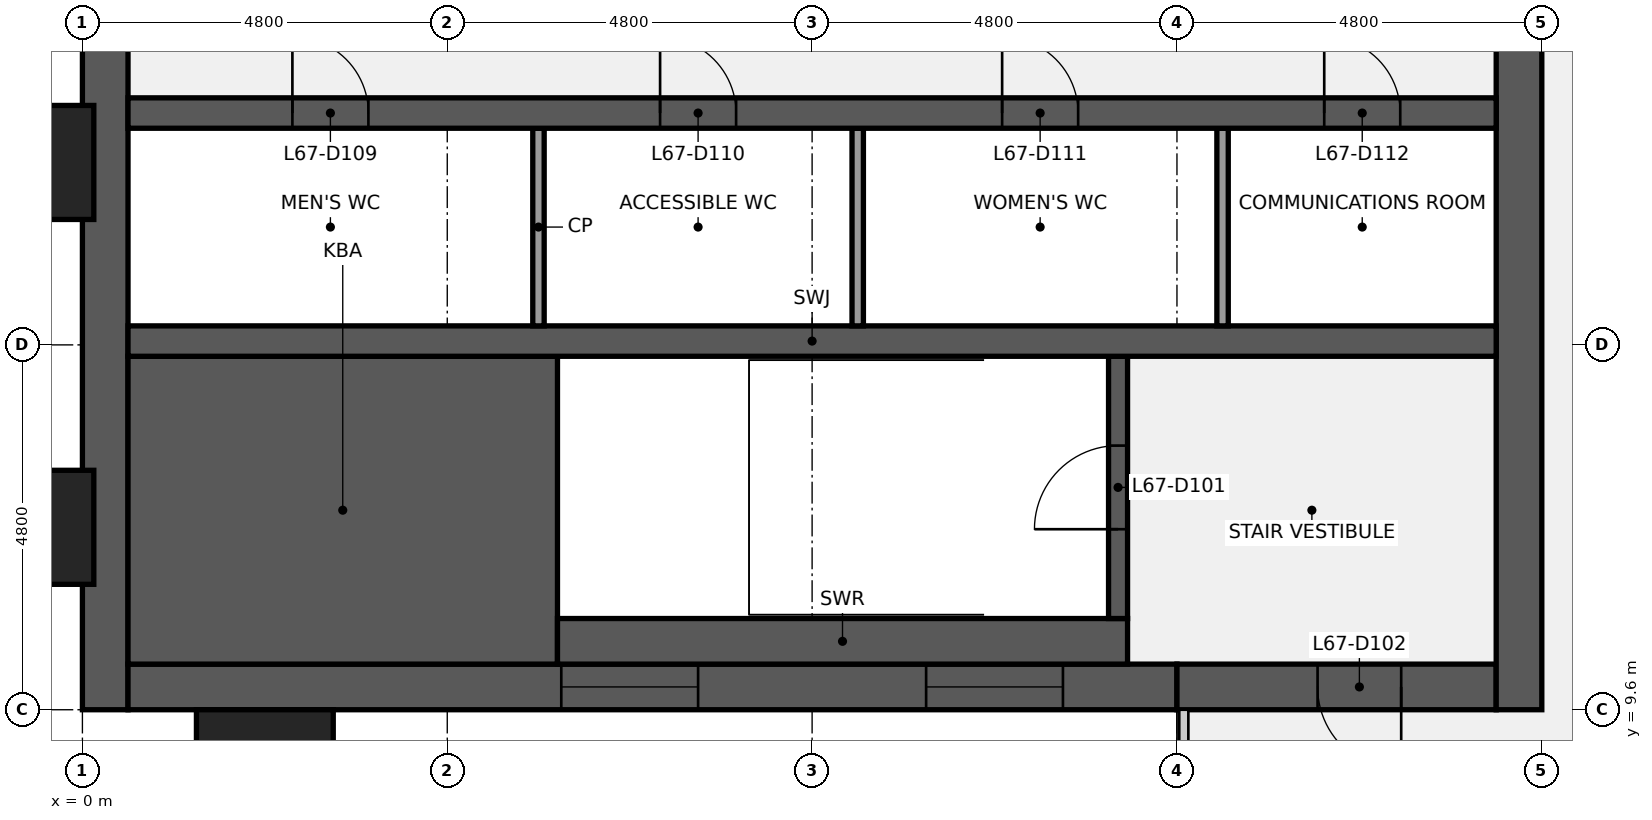
"""IFC4 building model, lengths in metres.
Left out: names, types, materials, properties, quantities, classifications, styles, units other than length and angle.
Written with IfcOpenShell. Run it as: python <this file> out.ifc"""

import sys

from ifc_helpers import new_model, si_unit, direction, frame, frame_2d, origin, origin_2d, place, context, subcontext, project, spatial, rectangle, extrude, element, fill, save


model = new_model("IFC4")
c1 = context("Model", 3, precision=1e-05, world=origin(), true_north=direction((0.0, 1.0)))
c2 = subcontext(c1, "Body", "Model", "MODEL_VIEW")
j1 = project(units=[si_unit("LENGTHUNIT", "METRE"), si_unit("PLANEANGLEUNIT", "RADIAN")], contexts=[c1])
p1 = place(None, origin())
s1 = spatial("IfcSite", under=j1, at=p1, CompositionType="ELEMENT")
p2 = place(p1, origin())
s2 = spatial("IfcBuilding", under=s1, at=p2, CompositionType="ELEMENT")
p3 = place(p2, frame((0.0, 0.0, 306.3)))
s3 = spatial("IfcBuildingStorey", under=s2, at=p3, CompositionType="ELEMENT", Elevation=306.3)
p4 = place(p3, frame((0.3, 9.6, 0.0), z_axis=(0.0, 0.0, 1.0), x_axis=(0.0, 1.0, 0.0)))
e1 = element("IfcWall", 1, at=p4, inside=s3, PredefinedType="SHEAR", context=c2, shape_type="SweptSolid", body=[
    extrude(rectangle(XDim=28.8, YDim=0.6, at=frame_2d((14.4, 0.0))), origin(), (0.0, 0.0, 1.0), 3.84),
])
p5 = place(p4, frame((8.85, 0.0, 0.9)))
e2 = element("IfcOpeningElement", 2, at=p5, cuts=e1, PredefinedType="OPENING", context=c2, shape_type="SweptSolid", body=[
    extrude(rectangle(XDim=1.5, YDim=1.5, at=frame_2d((0.75, 0.75))), frame((0.0, 0.31, 0.0), z_axis=(0.0, -1.0, 0.0), x_axis=(1.0, 0.0, 0.0)), (0.0, 0.0, 1.0), 0.62),
])
p6 = place(p4, frame((18.45, 0.0, 0.9)))
e3 = element("IfcOpeningElement", 3, at=p6, cuts=e1, PredefinedType="OPENING", context=c2, shape_type="SweptSolid", body=[
    extrude(rectangle(XDim=1.5, YDim=1.5, at=frame_2d((0.75, 0.75))), frame((0.0, 0.31, 0.0), z_axis=(0.0, -1.0, 0.0), x_axis=(1.0, 0.0, 0.0)), (0.0, 0.0, 1.0), 0.62),
])
p7 = place(p3, frame((14.4, 9.9, 0.0), z_axis=(0.0, 0.0, 1.0), x_axis=(-1.0, 0.0, 0.0)))
e4 = element("IfcWall", 4, at=p7, inside=s3, PredefinedType="SHEAR", context=c2, shape_type="SweptSolid", body=[
    extrude(rectangle(XDim=13.8, YDim=0.6, at=frame_2d((6.9, 0.0))), origin(), (0.0, 0.0, 1.0), 3.84),
])
p8 = place(p7, frame((6.3, 0.0, 0.9)))
e5 = element("IfcOpeningElement", 5, at=p8, cuts=e4, PredefinedType="OPENING", context=c2, shape_type="SweptSolid", body=[
    extrude(rectangle(XDim=1.8, YDim=1.5, at=frame_2d((0.9, 0.75))), frame((0.0, 0.31, 0.0), z_axis=(0.0, -1.0, 0.0), x_axis=(1.0, 0.0, 0.0)), (0.0, 0.0, 1.0), 0.62),
])
p9 = place(p7, frame((1.5, 0.0, 0.9)))
e6 = element("IfcOpeningElement", 6, at=p9, cuts=e4, PredefinedType="OPENING", context=c2, shape_type="SweptSolid", body=[
    extrude(rectangle(XDim=1.8, YDim=1.5, at=frame_2d((0.9, 0.75))), frame((0.0, 0.31, 0.0), z_axis=(0.0, -1.0, 0.0), x_axis=(1.0, 0.0, 0.0)), (0.0, 0.0, 1.0), 0.62),
])
p10 = place(p3, frame((18.6, 9.9, 0.0), z_axis=(0.0, 0.0, 1.0), x_axis=(-1.0, 0.0, 0.0)))
e7 = element("IfcWall", 7, at=p10, inside=s3, PredefinedType="SHEAR", context=c2, shape_type="SweptSolid", body=[
    extrude(rectangle(XDim=4.2, YDim=0.6, at=frame_2d((2.1, 0.0))), origin(), (0.0, 0.0, 1.0), 3.84),
])
p11 = place(p10, frame((1.25, 0.0, 0.0)))
e8 = element("IfcOpeningElement", 8, at=p11, cuts=e7, PredefinedType="OPENING", context=c2, shape_type="SweptSolid", body=[
    extrude(rectangle(XDim=1.1, YDim=2.1, at=frame_2d((0.55, 1.05))), frame((0.0, 0.31, 0.0), z_axis=(0.0, -1.0, 0.0), x_axis=(1.0, 0.0, 0.0)), (0.0, 0.0, 1.0), 0.62),
])
p12 = place(p3, frame((18.9, 38.4, 0.0), z_axis=(0.0, 0.0, 1.0), x_axis=(0.0, -1.0, 0.0)))
e9 = element("IfcWall", 9, at=p12, inside=s3, PredefinedType="SHEAR", context=c2, shape_type="SweptSolid", body=[
    extrude(rectangle(XDim=28.8, YDim=0.6, at=frame_2d((14.4, 0.0))), origin(), (0.0, 0.0, 1.0), 3.84),
])
p13 = place(p12, frame((18.3, 0.0, 0.0)))
e10 = element("IfcOpeningElement", 10, at=p13, cuts=e9, PredefinedType="OPENING", context=c2, shape_type="SweptSolid", body=[
    extrude(rectangle(XDim=1.8, YDim=2.1, at=frame_2d((0.9, 1.05))), frame((0.0, 0.31, 0.0), z_axis=(0.0, -1.0, 0.0), x_axis=(1.0, 0.0, 0.0)), (0.0, 0.0, 1.0), 0.62),
])
p14 = place(p12, frame((8.7, 0.0, 0.0)))
e11 = element("IfcOpeningElement", 11, at=p14, cuts=e9, PredefinedType="OPENING", context=c2, shape_type="SweptSolid", body=[
    extrude(rectangle(XDim=1.8, YDim=2.1, at=frame_2d((0.9, 1.05))), frame((0.0, 0.31, 0.0), z_axis=(0.0, -1.0, 0.0), x_axis=(1.0, 0.0, 0.0)), (0.0, 0.0, 1.0), 0.62),
])
p15 = place(p3, frame((0.6, 12.225, 0.0), z_axis=(0.0, 0.0, 1.0), x_axis=(1.0, 0.0, 0.0)))
e12 = element("IfcWall", 12, at=p15, inside=s3, PredefinedType="SHEAR", context=c2, shape_type="SweptSolid", body=[
    extrude(rectangle(XDim=5.65, YDim=4.05, at=frame_2d((2.825, 0.0))), origin(), (0.0, 0.0, 1.0), 3.84),
])
p16 = place(p3, frame((6.25, 10.5, 0.0), z_axis=(0.0, 0.0, 1.0), x_axis=(1.0, 0.0, 0.0)))
e13 = element("IfcWall", 13, at=p16, inside=s3, PredefinedType="SHEAR", context=c2, shape_type="SweptSolid", body=[
    extrude(rectangle(XDim=7.5, YDim=0.6, at=frame_2d((3.75, 0.0))), origin(), (0.0, 0.0, 1.0), 3.84),
])
p17 = place(p3, frame((13.625, 10.8, 0.0), z_axis=(0.0, 0.0, 1.0), x_axis=(0.0, 1.0, 0.0)))
e14 = element("IfcWall", 14, at=p17, inside=s3, PredefinedType="SHEAR", context=c2, shape_type="SweptSolid", body=[
    extrude(rectangle(XDim=3.45, YDim=0.25, at=frame_2d((1.725, 0.0))), origin(), (0.0, 0.0, 1.0), 3.84),
])
p18 = place(p17, frame((1.175, 0.0, 0.0)))
e15 = element("IfcOpeningElement", 15, at=p18, cuts=e14, PredefinedType="OPENING", context=c2, shape_type="SweptSolid", body=[
    extrude(rectangle(XDim=1.1, YDim=2.1, at=frame_2d((0.55, 1.05))), frame((0.0, 0.135, 0.0), z_axis=(0.0, -1.0, 0.0), x_axis=(1.0, 0.0, 0.0)), (0.0, 0.0, 1.0), 0.27),
])
p19 = place(p3, frame((0.6, 14.45, 0.0), z_axis=(0.0, 0.0, 1.0), x_axis=(1.0, 0.0, 0.0)))
e16 = element("IfcWall", 16, at=p19, inside=s3, PredefinedType="SHEAR", context=c2, shape_type="SweptSolid", body=[
    extrude(rectangle(XDim=18.0, YDim=0.4, at=frame_2d((9.0, 0.0))), origin(), (0.0, 0.0, 1.0), 3.84),
])
for number, where, z_axis, x_axis in (
    (17, (6.0, 14.65, 0.0), (0.0, 0.0, 1.0), (0.0, 1.0, 0.0)),
    (18, (10.2, 14.65, 0.0), (0.0, 0.0, 1.0), (0.0, 1.0, 0.0)),
    (19, (15.0, 14.65, 0.0), (0.0, 0.0, 1.0), (0.0, 1.0, 0.0)),
):
    element("IfcWall", number, at=place(p3, frame(where, z_axis=z_axis, x_axis=x_axis)), inside=s3, PredefinedType="PARTITIONING", context=c2, shape_type="SweptSolid", body=[
        extrude(rectangle(XDim=2.6, YDim=0.15, at=frame_2d((1.3, 0.0))), origin(), (0.0, 0.0, 1.0), 3.84),
    ])
p20 = place(p3, frame((0.6, 17.45, 0.0), z_axis=(0.0, 0.0, 1.0), x_axis=(1.0, 0.0, 0.0)))
e20 = element("IfcWall", 20, at=p20, inside=s3, PredefinedType="SHEAR", context=c2, shape_type="SweptSolid", body=[
    extrude(rectangle(XDim=18.0, YDim=0.4, at=frame_2d((9.0, 0.0))), origin(), (0.0, 0.0, 1.0), 3.84),
])
p21 = place(p20, frame((2.163, 0.0, 0.0)))
e21 = element("IfcOpeningElement", 21, at=p21, cuts=e20, PredefinedType="OPENING", context=c2, shape_type="SweptSolid", body=[
    extrude(rectangle(XDim=1.0, YDim=2.1, at=frame_2d((0.5, 1.05))), frame((0.0, 0.21, 0.0), z_axis=(0.0, -1.0, 0.0), x_axis=(1.0, 0.0, 0.0)), (0.0, 0.0, 1.0), 0.42),
])
p22 = place(p20, frame((7.0, 0.0, 0.0)))
e22 = element("IfcOpeningElement", 22, at=p22, cuts=e20, PredefinedType="OPENING", context=c2, shape_type="SweptSolid", body=[
    extrude(rectangle(XDim=1.0, YDim=2.1, at=frame_2d((0.5, 1.05))), frame((0.0, 0.21, 0.0), z_axis=(0.0, -1.0, 0.0), x_axis=(1.0, 0.0, 0.0)), (0.0, 0.0, 1.0), 0.42),
])
p23 = place(p20, frame((11.5, 0.0, 0.0)))
e23 = element("IfcOpeningElement", 23, at=p23, cuts=e20, PredefinedType="OPENING", context=c2, shape_type="SweptSolid", body=[
    extrude(rectangle(XDim=1.0, YDim=2.1, at=frame_2d((0.5, 1.05))), frame((0.0, 0.21, 0.0), z_axis=(0.0, -1.0, 0.0), x_axis=(1.0, 0.0, 0.0)), (0.0, 0.0, 1.0), 0.42),
])
p24 = place(p20, frame((15.738, 0.0, 0.0)))
e24 = element("IfcOpeningElement", 24, at=p24, cuts=e20, PredefinedType="OPENING", context=c2, shape_type="SweptSolid", body=[
    extrude(rectangle(XDim=1.0, YDim=2.1, at=frame_2d((0.5, 1.05))), frame((0.0, 0.21, 0.0), z_axis=(0.0, -1.0, 0.0), x_axis=(1.0, 0.0, 0.0)), (0.0, 0.0, 1.0), 0.42),
])
for number, where, z_axis, x_axis in (
    (25, (-0.75, 12.0, 0.0), (0.0, 0.0, 1.0), (0.0, 1.0, 0.0)),
    (26, (-0.75, 16.8, 0.0), (0.0, 0.0, 1.0), (0.0, 1.0, 0.0)),
    (27, (2.4, 8.85, 0.0), (0.0, 0.0, 1.0), (1.0, 0.0, 0.0)),
):
    element("IfcColumn", number, at=place(p3, frame(where, z_axis=z_axis, x_axis=x_axis)), inside=s3, PredefinedType="PILASTER", context=c2, shape_type="SweptSolid", body=[
        extrude(rectangle(XDim=1.8, YDim=1.5, at=origin_2d()), origin(), (0.0, 0.0, 1.0), 4.0),
    ])
p25 = place(p18, origin())
e28 = element("IfcDoor", 28, at=p25, inside=s3, OperationType="SINGLE_SWING_LEFT", PredefinedType="DOOR", context=c2, shape_type="SweptSolid", body=[
    extrude(rectangle(XDim=1.1, YDim=2.1, at=frame_2d((0.55, 1.05))), frame((0.0, 0.025, 0.0), z_axis=(0.0, -1.0, 0.0), x_axis=(1.0, 0.0, 0.0)), (0.0, 0.0, 1.0), 0.05),
])
fill(e15, e28)
p26 = place(p11, origin())
e29 = element("IfcDoor", 29, at=p26, inside=s3, OperationType="SINGLE_SWING_LEFT", PredefinedType="DOOR", context=c2, shape_type="SweptSolid", body=[
    extrude(rectangle(XDim=1.1, YDim=2.1, at=frame_2d((0.55, 1.05))), frame((0.0, 0.025, 0.0), z_axis=(0.0, -1.0, 0.0), x_axis=(1.0, 0.0, 0.0)), (0.0, 0.0, 1.0), 0.05),
])
fill(e8, e29)
p27 = place(p21, origin())
e30 = element("IfcDoor", 30, at=p27, inside=s3, OperationType="SINGLE_SWING_LEFT", PredefinedType="DOOR", context=c2, shape_type="SweptSolid", body=[
    extrude(rectangle(XDim=1.0, YDim=2.1, at=frame_2d((0.5, 1.05))), frame((0.0, 0.025, 0.0), z_axis=(0.0, -1.0, 0.0), x_axis=(1.0, 0.0, 0.0)), (0.0, 0.0, 1.0), 0.05),
])
fill(e21, e30)
p28 = place(p22, origin())
e31 = element("IfcDoor", 31, at=p28, inside=s3, OperationType="SINGLE_SWING_LEFT", PredefinedType="DOOR", context=c2, shape_type="SweptSolid", body=[
    extrude(rectangle(XDim=1.0, YDim=2.1, at=frame_2d((0.5, 1.05))), frame((0.0, 0.025, 0.0), z_axis=(0.0, -1.0, 0.0), x_axis=(1.0, 0.0, 0.0)), (0.0, 0.0, 1.0), 0.05),
])
fill(e22, e31)
p29 = place(p23, origin())
e32 = element("IfcDoor", 32, at=p29, inside=s3, OperationType="SINGLE_SWING_LEFT", PredefinedType="DOOR", context=c2, shape_type="SweptSolid", body=[
    extrude(rectangle(XDim=1.0, YDim=2.1, at=frame_2d((0.5, 1.05))), frame((0.0, 0.025, 0.0), z_axis=(0.0, -1.0, 0.0), x_axis=(1.0, 0.0, 0.0)), (0.0, 0.0, 1.0), 0.05),
])
fill(e23, e32)
p30 = place(p24, origin())
e33 = element("IfcDoor", 33, at=p30, inside=s3, OperationType="SINGLE_SWING_LEFT", PredefinedType="DOOR", context=c2, shape_type="SweptSolid", body=[
    extrude(rectangle(XDim=1.0, YDim=2.1, at=frame_2d((0.5, 1.05))), frame((0.0, 0.025, 0.0), z_axis=(0.0, -1.0, 0.0), x_axis=(1.0, 0.0, 0.0)), (0.0, 0.0, 1.0), 0.05),
])
fill(e24, e33)
p31 = place(p8, origin())
e34 = element("IfcWindow", 34, at=p31, inside=s3, PartitioningType="SINGLE_PANEL", PredefinedType="WINDOW", context=c2, shape_type="SweptSolid", body=[
    extrude(rectangle(XDim=1.8, YDim=1.5, at=frame_2d((0.9, 0.75))), frame((0.0, 0.03, 0.0), z_axis=(0.0, -1.0, 0.0), x_axis=(1.0, 0.0, 0.0)), (0.0, 0.0, 1.0), 0.06),
])
fill(e5, e34)
p32 = place(p9, origin())
e35 = element("IfcWindow", 35, at=p32, inside=s3, PartitioningType="SINGLE_PANEL", PredefinedType="WINDOW", context=c2, shape_type="SweptSolid", body=[
    extrude(rectangle(XDim=1.8, YDim=1.5, at=frame_2d((0.9, 0.75))), frame((0.0, 0.03, 0.0), z_axis=(0.0, -1.0, 0.0), x_axis=(1.0, 0.0, 0.0)), (0.0, 0.0, 1.0), 0.06),
])
fill(e6, e35)
save(model, sys.argv[1])
